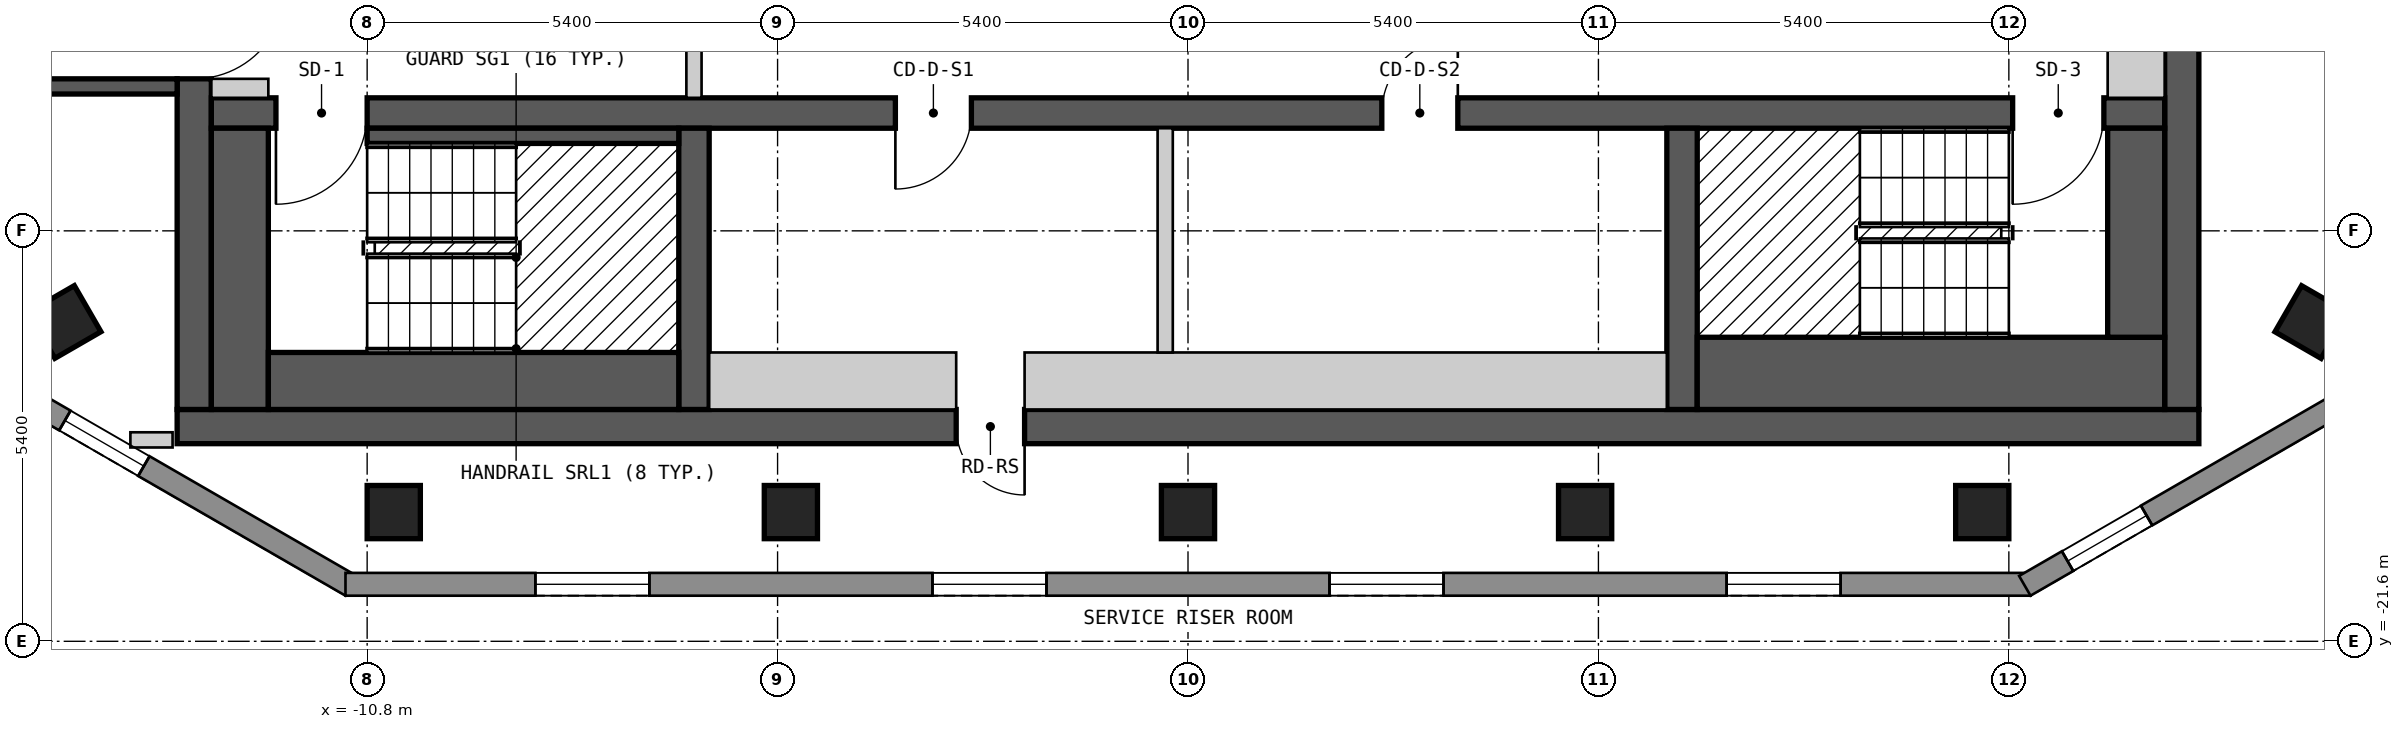
"""IFC4 building model, lengths in metres.
Left out: names, types, materials, properties, quantities, classifications, styles, units other than length and angle.
Written with IfcOpenShell. Run it as: python <this file> out.ifc"""

import sys

from ifc_helpers import new_model, si_unit, direction, frame, frame_2d, origin, origin_2d, place, context, subcontext, project, spatial, polyline, rectangle, outline, extrude, element, fill, save


model = new_model("IFC4")
c1 = context("Model", 3, precision=1e-05, world=origin(), true_north=direction((0.0, 1.0)))
c2 = subcontext(c1, "Body", "Model", "MODEL_VIEW")
j1 = project(units=[si_unit("LENGTHUNIT", "METRE"), si_unit("PLANEANGLEUNIT", "RADIAN")], contexts=[c1])
p1 = place(None, origin())
s1 = spatial("IfcSite", under=j1, at=p1, CompositionType="ELEMENT")
p2 = place(p1, origin())
s2 = spatial("IfcBuilding", under=s1, at=p2, CompositionType="ELEMENT")
p3 = place(p2, frame((0.0, 0.0, 235.8)))
s3 = spatial("IfcBuildingStorey", under=s2, at=p3, CompositionType="ELEMENT", Elevation=235.8)
for number, where, z_axis, x_axis in (
    (1, (-14.781, -17.399, 0.0), (0.0, 0.0, 1.0), (0.5, -0.866, 0.0)),
    (2, (-10.45, -19.9, 0.0), (0.0, 0.0, 1.0), (1.0, 0.0, 0.0)),
    (3, (-5.225, -19.9, 0.0), (0.0, 0.0, 1.0), (1.0, 0.0, 0.0)),
    (4, (0.0, -19.9, 0.0), (0.0, 0.0, 1.0), (1.0, 0.0, 0.0)),
    (5, (5.225, -19.9, 0.0), (0.0, 0.0, 1.0), (1.0, 0.0, 0.0)),
    (6, (10.45, -19.9, 0.0), (0.0, 0.0, 1.0), (1.0, 0.0, 0.0)),
    (7, (14.78, -17.4, 0.0), (0.0, 0.0, 1.0), (0.5, 0.866, 0.0)),
):
    element("IfcColumn", number, at=place(p3, frame(where, z_axis=z_axis, x_axis=x_axis)), inside=s3, PredefinedType="COLUMN", context=c2, shape_type="SweptSolid", body=[
        extrude(rectangle(XDim=0.7, YDim=0.7, at=origin_2d()), origin(), (0.0, 0.0, 1.0), 3.0),
    ])
p4 = place(p3, frame((-13.3, -18.775, 0.0), z_axis=(0.0, 0.0, 1.0), x_axis=(1.0, 0.0, 0.0)))
e8 = element("IfcWall", 8, at=p4, inside=s3, PredefinedType="SHEAR", context=c2, shape_type="SweptSolid", body=[
    extrude(rectangle(XDim=26.6, YDim=0.45, at=frame_2d((13.3, 0.0))), origin(), (0.0, 0.0, 1.0), 2.7),
])
p5 = place(p4, frame((10.25, 0.0, 0.0)))
e9 = element("IfcOpeningElement", 9, at=p5, cuts=e8, PredefinedType="OPENING", context=c2, shape_type="SweptSolid", body=[
    extrude(rectangle(XDim=0.9, YDim=2.1, at=frame_2d((0.45, 1.05))), frame((0.0, 0.235, 0.0), z_axis=(0.0, -1.0, 0.0), x_axis=(1.0, 0.0, 0.0)), (0.0, 0.0, 1.0), 0.47),
])
p6 = place(p3, frame((-13.075, -18.55, 0.0), z_axis=(0.0, 0.0, 1.0), x_axis=(0.0, 1.0, 0.0)))
e10 = element("IfcWall", 10, at=p6, inside=s3, PredefinedType="SHEAR", context=c2, shape_type="SweptSolid", body=[
    extrude(rectangle(XDim=13.1, YDim=0.45, at=frame_2d((6.55, 0.0))), origin(), (0.0, 0.0, 1.0), 2.7),
])
p7 = place(p6, frame((4.35, 0.0, 0.0)))
e11 = element("IfcOpeningElement", 11, at=p7, cuts=e10, PredefinedType="OPENING", context=c2, shape_type="SweptSolid", body=[
    extrude(rectangle(XDim=1.2, YDim=2.1, at=frame_2d((0.6, 1.05))), frame((0.0, 0.235, 0.0), z_axis=(0.0, -1.0, 0.0), x_axis=(1.0, 0.0, 0.0)), (0.0, 0.0, 1.0), 0.47),
])
p8 = place(p3, frame((13.075, -18.55, 0.0), z_axis=(0.0, 0.0, 1.0), x_axis=(0.0, 1.0, 0.0)))
e12 = element("IfcWall", 12, at=p8, inside=s3, PredefinedType="SHEAR", context=c2, shape_type="SweptSolid", body=[
    extrude(rectangle(XDim=13.1, YDim=0.45, at=frame_2d((6.55, 0.0))), origin(), (0.0, 0.0, 1.0), 2.7),
])
p9 = place(p3, frame((-12.85, -14.65, 0.0), z_axis=(0.0, 0.0, 1.0), x_axis=(1.0, 0.0, 0.0)))
e13 = element("IfcWall", 13, at=p9, inside=s3, PredefinedType="SHEAR", context=c2, shape_type="SweptSolid", body=[
    extrude(rectangle(XDim=25.7, YDim=0.4, at=frame_2d((12.85, 0.0))), origin(), (0.0, 0.0, 1.0), 2.7),
])
p10 = place(p9, frame((2.05, 0.0, 0.0), z_axis=(0.0, 0.0, 1.0), x_axis=(-1.0, 0.0, 0.0)))
e14 = element("IfcOpeningElement", 14, at=p10, cuts=e13, PredefinedType="OPENING", context=c2, shape_type="SweptSolid", body=[
    extrude(rectangle(XDim=1.2, YDim=2.1, at=frame_2d((0.6, 1.05))), frame((0.0, 0.21, 0.0), z_axis=(0.0, -1.0, 0.0), x_axis=(1.0, 0.0, 0.0)), (0.0, 0.0, 1.0), 0.42),
])
p11 = place(p9, frame((24.9, 0.0, 0.0), z_axis=(0.0, 0.0, 1.0), x_axis=(-1.0, 0.0, 0.0)))
e15 = element("IfcOpeningElement", 15, at=p11, cuts=e13, PredefinedType="OPENING", context=c2, shape_type="SweptSolid", body=[
    extrude(rectangle(XDim=1.2, YDim=2.1, at=frame_2d((0.6, 1.05))), frame((0.0, 0.21, 0.0), z_axis=(0.0, -1.0, 0.0), x_axis=(1.0, 0.0, 0.0)), (0.0, 0.0, 1.0), 0.42),
])
p12 = place(p9, frame((10.0, 0.0, 0.0), z_axis=(0.0, 0.0, 1.0), x_axis=(-1.0, 0.0, 0.0)))
e16 = element("IfcOpeningElement", 16, at=p12, cuts=e13, PredefinedType="OPENING", context=c2, shape_type="SweptSolid", body=[
    extrude(rectangle(XDim=1.0, YDim=2.1, at=frame_2d((0.5, 1.05))), frame((0.0, 0.21, 0.0), z_axis=(0.0, -1.0, 0.0), x_axis=(1.0, 0.0, 0.0)), (0.0, 0.0, 1.0), 0.42),
])
p13 = place(p9, frame((16.4, 0.0, 0.0), z_axis=(0.0, 0.0, 1.0), x_axis=(-1.0, 0.0, 0.0)))
e17 = element("IfcOpeningElement", 17, at=p13, cuts=e13, PredefinedType="OPENING", context=c2, shape_type="SweptSolid", body=[
    extrude(rectangle(XDim=1.0, YDim=2.1, at=frame_2d((0.5, 1.05))), frame((0.0, 0.21, 0.0), z_axis=(0.0, -1.0, 0.0), x_axis=(1.0, 0.0, 0.0)), (0.0, 0.0, 1.0), 0.42),
])
for number, where, z_axis, x_axis in (
    (18, (-6.5, -18.55, 0.0), (0.0, 0.0, 1.0), (0.0, 1.0, 0.0)),
    (19, (6.5, -18.55, 0.0), (0.0, 0.0, 1.0), (0.0, 1.0, 0.0)),
):
    element("IfcWall", number, at=place(p3, frame(where, z_axis=z_axis, x_axis=x_axis)), inside=s3, PredefinedType="SHEAR", context=c2, shape_type="SweptSolid", body=[
        extrude(rectangle(XDim=3.7, YDim=0.4, at=frame_2d((1.85, 0.0))), origin(), (0.0, 0.0, 1.0), 2.7),
    ])
p14 = place(p3, frame((-15.34, -18.37, 0.0), z_axis=(0.0, 0.0, 1.0), x_axis=(0.866022959057, -0.500004234368, 0.0)))
e20 = element("IfcWall", 20, at=p14, inside=s3, PredefinedType="SOLIDWALL", context=c2, shape_type="SweptSolid", body=[
    extrude(outline(polyline([(0.0, -0.15), (5.0, -0.15), (4.92, 0.15), (0.08, 0.15), (0.0, -0.15)])), origin(), (0.0, 0.0, 1.0), 2.7),
])
p15 = place(p14, frame((0.65, 0.0, 0.15)))
e21 = element("IfcOpeningElement", 21, at=p15, cuts=e20, PredefinedType="OPENING", context=c2, shape_type="SweptSolid", body=[
    extrude(rectangle(XDim=1.2, YDim=2.1, at=frame_2d((0.6, 1.05))), frame((0.0, 0.16, 0.0), z_axis=(0.0, -1.0, 0.0), x_axis=(1.0, 0.0, 0.0)), (0.0, 0.0, 1.0), 0.32),
])
p16 = place(p3, frame((-11.085, -20.85, 0.0), z_axis=(0.0, 0.0, 1.0), x_axis=(1.0, 0.0, 0.0)))
e22 = element("IfcWall", 22, at=p16, inside=s3, PredefinedType="SOLIDWALL", context=c2, shape_type="SweptSolid", body=[
    extrude(outline(polyline([(0.0, -0.15), (22.17, -0.15), (22.09, 0.15), (0.08, 0.15), (0.0, -0.15)])), origin(), (0.0, 0.0, 1.0), 2.7),
])
p17 = place(p16, frame((2.498, 0.0, 0.15)))
e23 = element("IfcOpeningElement", 23, at=p17, cuts=e22, PredefinedType="OPENING", context=c2, shape_type="SweptSolid", body=[
    extrude(rectangle(XDim=1.5, YDim=2.1, at=frame_2d((0.75, 1.05))), frame((0.0, 0.16, 0.0), z_axis=(0.0, -1.0, 0.0), x_axis=(1.0, 0.0, 0.0)), (0.0, 0.0, 1.0), 0.32),
])
p18 = place(p16, frame((7.723, 0.0, 0.15)))
e24 = element("IfcOpeningElement", 24, at=p18, cuts=e22, PredefinedType="OPENING", context=c2, shape_type="SweptSolid", body=[
    extrude(rectangle(XDim=1.5, YDim=2.1, at=frame_2d((0.75, 1.05))), frame((0.0, 0.16, 0.0), z_axis=(0.0, -1.0, 0.0), x_axis=(1.0, 0.0, 0.0)), (0.0, 0.0, 1.0), 0.32),
])
p19 = place(p16, frame((12.947, 0.0, 0.15)))
e25 = element("IfcOpeningElement", 25, at=p19, cuts=e22, PredefinedType="OPENING", context=c2, shape_type="SweptSolid", body=[
    extrude(rectangle(XDim=1.5, YDim=2.1, at=frame_2d((0.75, 1.05))), frame((0.0, 0.16, 0.0), z_axis=(0.0, -1.0, 0.0), x_axis=(1.0, 0.0, 0.0)), (0.0, 0.0, 1.0), 0.32),
])
p20 = place(p16, frame((18.172, 0.0, 0.15)))
e26 = element("IfcOpeningElement", 26, at=p20, cuts=e22, PredefinedType="OPENING", context=c2, shape_type="SweptSolid", body=[
    extrude(rectangle(XDim=1.5, YDim=2.1, at=frame_2d((0.75, 1.05))), frame((0.0, 0.16, 0.0), z_axis=(0.0, -1.0, 0.0), x_axis=(1.0, 0.0, 0.0)), (0.0, 0.0, 1.0), 0.32),
])
p21 = place(p3, frame((11.01, -20.87, 0.0), z_axis=(0.0, 0.0, 1.0), x_axis=(0.866022959057, 0.500004234368, 0.0)))
e27 = element("IfcWall", 27, at=p21, inside=s3, PredefinedType="SOLIDWALL", context=c2, shape_type="SweptSolid", body=[
    extrude(outline(polyline([(0.0, -0.15), (5.0, -0.15), (4.92, 0.15), (0.08, 0.15), (0.0, -0.15)])), origin(), (0.0, 0.0, 1.0), 2.7),
])
p22 = place(p21, frame((0.65, 0.0, 0.15)))
e28 = element("IfcOpeningElement", 28, at=p22, cuts=e27, PredefinedType="OPENING", context=c2, shape_type="SweptSolid", body=[
    extrude(rectangle(XDim=1.2, YDim=2.1, at=frame_2d((0.6, 1.05))), frame((0.0, 0.16, 0.0), z_axis=(0.0, -1.0, 0.0), x_axis=(1.0, 0.0, 0.0)), (0.0, 0.0, 1.0), 0.32),
])
p23 = place(p3, frame((-13.915, -18.95, 0.0), z_axis=(0.0, 0.0, 1.0), x_axis=(1.0, 0.0, 0.0)))
e29 = element("IfcWall", 29, at=p23, inside=s3, PredefinedType="PARTITIONING", context=c2, shape_type="SweptSolid", body=[
    extrude(rectangle(XDim=0.555, YDim=0.2, at=frame_2d((0.277, 0.0))), origin(), (0.0, 0.0, 1.0), 2.7),
])
p24 = place(p3, frame((-16.05, -14.3, 0.0), z_axis=(0.0, 0.0, 1.0), x_axis=(1.0, 0.0, 0.0)))
e30 = element("IfcWall", 30, at=p24, inside=s3, PredefinedType="SOLIDWALL", context=c2, shape_type="SweptSolid", body=[
    extrude(rectangle(XDim=2.75, YDim=0.2, at=frame_2d((1.375, 0.0))), origin(), (0.0, 0.0, 1.0), 2.7),
])
p25 = place(p3, frame((-12.475, -18.55, 0.0), z_axis=(0.0, 0.0, 1.0), x_axis=(0.0, 1.0, 0.0)))
e31 = element("IfcWall", 31, at=p25, inside=s3, PredefinedType="SOLIDWALL", context=c2, shape_type="SweptSolid", body=[
    extrude(rectangle(XDim=3.7, YDim=0.75, at=frame_2d((1.85, 0.0))), origin(), (0.0, 0.0, 1.0), 2.7),
])
p26 = place(p3, frame((-12.85, -14.325, 0.0), z_axis=(0.0, 0.0, 1.0), x_axis=(1.0, 0.0, 0.0)))
e32 = element("IfcWall", 32, at=p26, inside=s3, PredefinedType="PARTITIONING", context=c2, shape_type="SweptSolid", body=[
    extrude(rectangle(XDim=0.75, YDim=0.25, at=frame_2d((0.375, 0.0))), origin(), (0.0, 0.0, 1.0), 2.7),
])
p27 = place(p3, frame((-12.1, -18.175, 0.0), z_axis=(0.0, 0.0, 1.0), x_axis=(1.0, 0.0, 0.0)))
e33 = element("IfcWall", 33, at=p27, inside=s3, PredefinedType="SOLIDWALL", context=c2, shape_type="SweptSolid", body=[
    extrude(rectangle(XDim=5.4, YDim=0.75, at=frame_2d((2.7, 0.0))), origin(), (0.0, 0.0, 1.0), 2.7),
])
p28 = place(p3, frame((-10.8, -14.95, 0.0), z_axis=(0.0, 0.0, 1.0), x_axis=(1.0, 0.0, 0.0)))
e34 = element("IfcWall", 34, at=p28, inside=s3, PredefinedType="SOLIDWALL", context=c2, shape_type="SweptSolid", body=[
    extrude(rectangle(XDim=4.1, YDim=0.2, at=frame_2d((2.05, 0.0))), origin(), (0.0, 0.0, 1.0), 2.7),
])
p29 = place(p3, frame((-6.5, -14.45, 0.0), z_axis=(0.0, 0.0, 1.0), x_axis=(0.0, 1.0, 0.0)))
e35 = element("IfcWall", 35, at=p29, inside=s3, PredefinedType="PARTITIONING", context=c2, shape_type="SweptSolid", body=[
    extrude(rectangle(XDim=4.9, YDim=0.2, at=frame_2d((2.45, 0.0))), origin(), (0.0, 0.0, 1.0), 2.7),
])
p30 = place(p29, frame((3.15, 0.0, 0.0), z_axis=(0.0, 0.0, 1.0), x_axis=(-1.0, 0.0, 0.0)))
e36 = element("IfcOpeningElement", 36, at=p30, cuts=e35, PredefinedType="OPENING", context=c2, shape_type="SweptSolid", body=[
    extrude(rectangle(XDim=1.4, YDim=2.1, at=frame_2d((0.7, 1.05))), frame((0.0, 0.11, 0.0), z_axis=(0.0, -1.0, 0.0), x_axis=(1.0, 0.0, 0.0)), (0.0, 0.0, 1.0), 0.22),
])
p31 = place(p3, frame((-6.3, -18.175, 0.0), z_axis=(0.0, 0.0, 1.0), x_axis=(1.0, 0.0, 0.0)))
e37 = element("IfcWall", 37, at=p31, inside=s3, PredefinedType="PARTITIONING", context=c2, shape_type="SweptSolid", body=[
    extrude(rectangle(XDim=3.25, YDim=0.75, at=frame_2d((1.625, 0.0))), origin(), (0.0, 0.0, 1.0), 2.7),
])
p32 = place(p3, frame((-2.15, -18.175, 0.0), z_axis=(0.0, 0.0, 1.0), x_axis=(1.0, 0.0, 0.0)))
e38 = element("IfcWall", 38, at=p32, inside=s3, PredefinedType="PARTITIONING", context=c2, shape_type="SweptSolid", body=[
    extrude(rectangle(XDim=8.45, YDim=0.75, at=frame_2d((4.225, 0.0))), origin(), (0.0, 0.0, 1.0), 2.7),
])
p33 = place(p3, frame((-0.3, -17.8, 0.0), z_axis=(0.0, 0.0, 1.0), x_axis=(0.0, 1.0, 0.0)))
e39 = element("IfcWall", 39, at=p33, inside=s3, PredefinedType="PARTITIONING", context=c2, shape_type="SweptSolid", body=[
    extrude(rectangle(XDim=2.95, YDim=0.2, at=frame_2d((1.475, 0.0))), origin(), (0.0, 0.0, 1.0), 2.7),
])
p34 = place(p3, frame((6.7, -18.075, 0.0), z_axis=(0.0, 0.0, 1.0), x_axis=(1.0, 0.0, 0.0)))
e40 = element("IfcWall", 40, at=p34, inside=s3, PredefinedType="SOLIDWALL", context=c2, shape_type="SweptSolid", body=[
    extrude(rectangle(XDim=6.15, YDim=0.95, at=frame_2d((3.075, 0.0))), origin(), (0.0, 0.0, 1.0), 2.7),
])
p35 = place(p3, frame((12.475, -17.6, 0.0), z_axis=(0.0, 0.0, 1.0), x_axis=(0.0, 1.0, 0.0)))
e41 = element("IfcWall", 41, at=p35, inside=s3, PredefinedType="SOLIDWALL", context=c2, shape_type="SweptSolid", body=[
    extrude(rectangle(XDim=2.75, YDim=0.75, at=frame_2d((1.375, 0.0))), origin(), (0.0, 0.0, 1.0), 2.7),
])
p36 = place(p3, frame((12.475, -14.45, 0.0), z_axis=(0.0, 0.0, 1.0), x_axis=(0.0, 1.0, 0.0)))
e42 = element("IfcWall", 42, at=p36, inside=s3, PredefinedType="PARTITIONING", context=c2, shape_type="SweptSolid", body=[
    extrude(rectangle(XDim=8.25, YDim=0.75, at=frame_2d((4.125, 0.0))), origin(), (0.0, 0.0, 1.0), 2.7),
])
p37 = place(p15, origin())
e43 = element("IfcWindow", 43, at=p37, inside=s3, PartitioningType="SINGLE_PANEL", PredefinedType="WINDOW", context=c2, shape_type="SweptSolid", body=[
    extrude(rectangle(XDim=1.2, YDim=2.1, at=frame_2d((0.6, 1.05))), frame((0.0, 0.03, 0.0), z_axis=(0.0, -1.0, 0.0), x_axis=(1.0, 0.0, 0.0)), (0.0, 0.0, 1.0), 0.06),
])
fill(e21, e43)
p38 = place(p17, origin())
e44 = element("IfcWindow", 44, at=p38, inside=s3, PartitioningType="SINGLE_PANEL", PredefinedType="WINDOW", context=c2, shape_type="SweptSolid", body=[
    extrude(rectangle(XDim=1.5, YDim=2.1, at=frame_2d((0.75, 1.05))), frame((0.0, 0.03, 0.0), z_axis=(0.0, -1.0, 0.0), x_axis=(1.0, 0.0, 0.0)), (0.0, 0.0, 1.0), 0.06),
])
fill(e23, e44)
p39 = place(p18, origin())
e45 = element("IfcWindow", 45, at=p39, inside=s3, PartitioningType="SINGLE_PANEL", PredefinedType="WINDOW", context=c2, shape_type="SweptSolid", body=[
    extrude(rectangle(XDim=1.5, YDim=2.1, at=frame_2d((0.75, 1.05))), frame((0.0, 0.03, 0.0), z_axis=(0.0, -1.0, 0.0), x_axis=(1.0, 0.0, 0.0)), (0.0, 0.0, 1.0), 0.06),
])
fill(e24, e45)
p40 = place(p19, origin())
e46 = element("IfcWindow", 46, at=p40, inside=s3, PartitioningType="SINGLE_PANEL", PredefinedType="WINDOW", context=c2, shape_type="SweptSolid", body=[
    extrude(rectangle(XDim=1.5, YDim=2.1, at=frame_2d((0.75, 1.05))), frame((0.0, 0.03, 0.0), z_axis=(0.0, -1.0, 0.0), x_axis=(1.0, 0.0, 0.0)), (0.0, 0.0, 1.0), 0.06),
])
fill(e25, e46)
p41 = place(p20, origin())
e47 = element("IfcWindow", 47, at=p41, inside=s3, PartitioningType="SINGLE_PANEL", PredefinedType="WINDOW", context=c2, shape_type="SweptSolid", body=[
    extrude(rectangle(XDim=1.5, YDim=2.1, at=frame_2d((0.75, 1.05))), frame((0.0, 0.03, 0.0), z_axis=(0.0, -1.0, 0.0), x_axis=(1.0, 0.0, 0.0)), (0.0, 0.0, 1.0), 0.06),
])
fill(e26, e47)
p42 = place(p22, origin())
e48 = element("IfcWindow", 48, at=p42, inside=s3, PartitioningType="SINGLE_PANEL", PredefinedType="WINDOW", context=c2, shape_type="SweptSolid", body=[
    extrude(rectangle(XDim=1.2, YDim=2.1, at=frame_2d((0.6, 1.05))), frame((0.0, 0.03, 0.0), z_axis=(0.0, -1.0, 0.0), x_axis=(1.0, 0.0, 0.0)), (0.0, 0.0, 1.0), 0.06),
])
fill(e28, e48)
p43 = place(p10, origin())
e49 = element("IfcDoor", 49, at=p43, inside=s3, OperationType="SINGLE_SWING_RIGHT", PredefinedType="DOOR", context=c2, shape_type="SweptSolid", body=[
    extrude(rectangle(XDim=1.2, YDim=2.1, at=frame_2d((0.6, 1.05))), frame((0.0, 0.025, 0.0), z_axis=(0.0, -1.0, 0.0), x_axis=(1.0, 0.0, 0.0)), (0.0, 0.0, 1.0), 0.05),
])
fill(e14, e49)
p44 = place(p11, origin())
e50 = element("IfcDoor", 50, at=p44, inside=s3, OperationType="SINGLE_SWING_RIGHT", PredefinedType="DOOR", context=c2, shape_type="SweptSolid", body=[
    extrude(rectangle(XDim=1.2, YDim=2.1, at=frame_2d((0.6, 1.05))), frame((0.0, 0.025, 0.0), z_axis=(0.0, -1.0, 0.0), x_axis=(1.0, 0.0, 0.0)), (0.0, 0.0, 1.0), 0.05),
])
fill(e15, e50)
p45 = place(p7, origin())
e51 = element("IfcDoor", 51, at=p45, inside=s3, OperationType="SINGLE_SWING_RIGHT", PredefinedType="DOOR", context=c2, shape_type="SweptSolid", body=[
    extrude(rectangle(XDim=1.2, YDim=2.1, at=frame_2d((0.6, 1.05))), frame((0.0, 0.025, 0.0), z_axis=(0.0, -1.0, 0.0), x_axis=(1.0, 0.0, 0.0)), (0.0, 0.0, 1.0), 0.05),
])
fill(e11, e51)
p46 = place(p12, origin())
e52 = element("IfcDoor", 52, at=p46, inside=s3, OperationType="SINGLE_SWING_RIGHT", PredefinedType="DOOR", context=c2, shape_type="SweptSolid", body=[
    extrude(rectangle(XDim=1.0, YDim=2.1, at=frame_2d((0.5, 1.05))), frame((0.0, 0.025, 0.0), z_axis=(0.0, -1.0, 0.0), x_axis=(1.0, 0.0, 0.0)), (0.0, 0.0, 1.0), 0.05),
])
fill(e16, e52)
p47 = place(p13, origin())
e53 = element("IfcDoor", 53, at=p47, inside=s3, OperationType="SINGLE_SWING_LEFT", PredefinedType="DOOR", context=c2, shape_type="SweptSolid", body=[
    extrude(rectangle(XDim=1.0, YDim=2.1, at=frame_2d((0.5, 1.05))), frame((0.0, 0.025, 0.0), z_axis=(0.0, -1.0, 0.0), x_axis=(1.0, 0.0, 0.0)), (0.0, 0.0, 1.0), 0.05),
])
fill(e17, e53)
p48 = place(p5, origin())
e54 = element("IfcDoor", 54, at=p48, inside=s3, OperationType="SINGLE_SWING_RIGHT", PredefinedType="DOOR", context=c2, shape_type="SweptSolid", body=[
    extrude(rectangle(XDim=0.9, YDim=2.1, at=frame_2d((0.45, 1.05))), frame((0.0, 0.025, 0.0), z_axis=(0.0, -1.0, 0.0), x_axis=(1.0, 0.0, 0.0)), (0.0, 0.0, 1.0), 0.05),
])
fill(e9, e54)
save(model, sys.argv[1])
